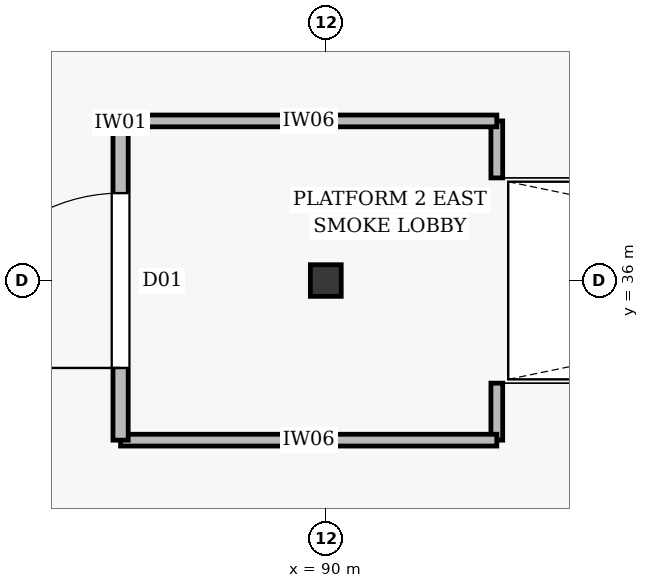
"""IFC4 building model, lengths in metres.
Left out: names, types, materials, properties, quantities, classifications, styles, units other than length and angle.
Written with IfcOpenShell. Run it as: python <this file> out.ifc"""

import sys

from ifc_helpers import new_model, si_unit, direction, frame, frame_2d, origin, origin_2d, place, context, subcontext, project, spatial, rectangle, i_section, extrude, element, fill, save


model = new_model("IFC4")
c1 = context("Model", 3, precision=1e-05, world=origin(), true_north=direction((0.0, 1.0)))
c2 = subcontext(c1, "Body", "Model", "MODEL_VIEW")
j1 = project(units=[si_unit("LENGTHUNIT", "METRE"), si_unit("PLANEANGLEUNIT", "RADIAN")], contexts=[c1])
p1 = place(None, origin())
s1 = spatial("IfcSite", under=j1, at=p1, CompositionType="ELEMENT")
p2 = place(p1, origin())
s2 = spatial("IfcBuilding", under=s1, at=p2, CompositionType="ELEMENT")
p3 = place(p2, frame((0.0, 0.0, 6.6)))
s3 = spatial("IfcBuildingStorey", under=s2, at=p3, CompositionType="ELEMENT", Elevation=6.6)
p4 = place(p3, frame((90.0, 36.0, 0.0), z_axis=(0.0, 0.0, 1.0), x_axis=(1.0, 0.0, 0.0)))
e1 = element("IfcColumn", 1, at=p4, inside=s3, PredefinedType="COLUMN", context=c2, shape_type="SweptSolid", body=[
    extrude(i_section(OverallWidth=0.406, OverallDepth=0.416, WebThickness=0.023, FlangeThickness=0.035, at=origin_2d()), origin(), (0.0, 0.0, 1.0), 6.0),
])
for number, where, z_axis, x_axis in (
    (2, (92.25, 33.9, 0.0), (0.0, 0.0, 1.0), (0.0, 1.0, 0.0)),
    (3, (92.25, 37.35, 0.0), (0.0, 0.0, 1.0), (0.0, 1.0, 0.0)),
):
    element("IfcWall", number, at=place(p3, frame(where, z_axis=z_axis, x_axis=x_axis)), inside=s3, PredefinedType="PARTITIONING", context=c2, shape_type="SweptSolid", body=[
        extrude(rectangle(XDim=0.75, YDim=0.155, at=frame_2d((0.375, 0.0))), origin(), (0.0, 0.0, 1.0), 2.62),
    ])
for number, where, z_axis, x_axis in (
    (4, (87.3, 33.9, 0.0), (0.0, 0.0, 1.0), (1.0, 0.0, 0.0)),
    (5, (87.3, 38.1, 0.0), (0.0, 0.0, 1.0), (1.0, 0.0, 0.0)),
):
    element("IfcWall", number, at=place(p3, frame(where, z_axis=z_axis, x_axis=x_axis)), inside=s3, PredefinedType="PARTITIONING", context=c2, shape_type="SweptSolid", body=[
        extrude(rectangle(XDim=4.95, YDim=0.155, at=frame_2d((2.475, 0.0))), origin(), (0.0, 0.0, 1.0), 2.62),
    ])
p5 = place(p3, frame((87.3, 33.9, 0.0), z_axis=(0.0, 0.0, 1.0), x_axis=(0.0, 1.0, 0.0)))
e6 = element("IfcWall", 6, at=p5, inside=s3, PredefinedType="PARTITIONING", context=c2, shape_type="SweptSolid", body=[
    extrude(rectangle(XDim=4.2, YDim=0.2, at=frame_2d((2.1, 0.0))), origin(), (0.0, 0.0, 1.0), 2.62),
])
p6 = place(p5, frame((0.95, 0.0, 0.005)))
e7 = element("IfcOpeningElement", 7, at=p6, cuts=e6, PredefinedType="OPENING", context=c2, shape_type="SweptSolid", body=[
    extrude(rectangle(XDim=2.3, YDim=2.4, at=frame_2d((1.15, 1.2))), frame((0.0, 0.112, 0.0), z_axis=(0.0, -1.0, 0.0), x_axis=(1.0, 0.0, 0.0)), (0.0, 0.0, 1.0), 0.224),
])
p7 = place(p6, origin())
e8 = element("IfcDoor", 8, at=p7, inside=s3, OperationType="DOUBLE_DOOR_SINGLE_SWING", PredefinedType="DOOR", context=c2, shape_type="SweptSolid", body=[
    extrude(rectangle(XDim=2.3, YDim=2.4, at=frame_2d((1.15, 1.2))), frame((0.0, 0.025, 0.0), z_axis=(0.0, -1.0, 0.0), x_axis=(1.0, 0.0, 0.0)), (0.0, 0.0, 1.0), 0.05),
])
fill(e7, e8)
save(model, sys.argv[1])
